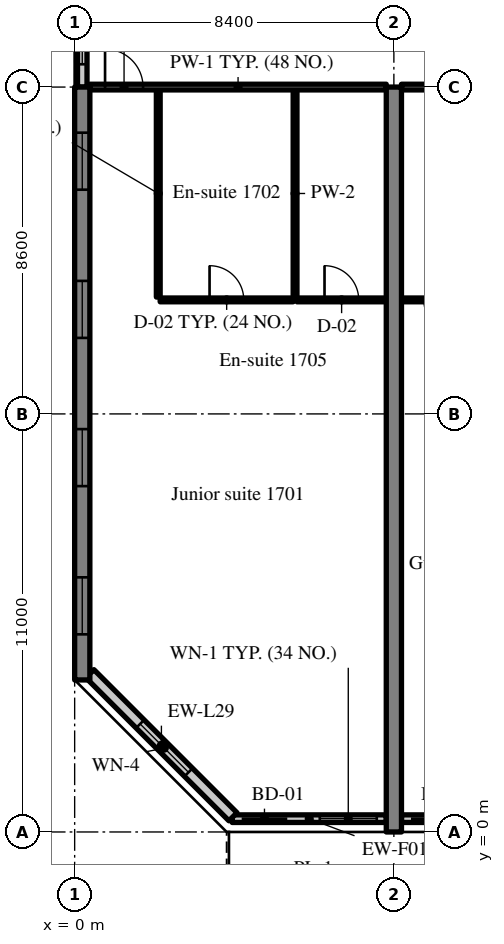
"""IFC4 building model, lengths in metres.
Left out: names, types, materials, properties, quantities, classifications, styles, units other than length and angle.
Written with IfcOpenShell. Run it as: python <this file> out.ifc"""

import sys

from ifc_helpers import new_model, si_unit, direction, frame, frame_2d, origin, place, context, subcontext, project, spatial, rectangle, extrude, source, transform, mapped, element, fill, save


model = new_model("IFC4")
c1 = context("Model", 3, precision=1e-05, world=origin(), true_north=direction((0.0, 1.0)))
c2 = subcontext(c1, "Body", "Model", "MODEL_VIEW")
j1 = project(units=[si_unit("LENGTHUNIT", "METRE"), si_unit("PLANEANGLEUNIT", "RADIAN")], contexts=[c1])
p1 = place(None, origin())
s1 = spatial("IfcSite", under=j1, at=p1, CompositionType="ELEMENT")
p2 = place(p1, origin())
s2 = spatial("IfcBuilding", under=s1, at=p2, CompositionType="ELEMENT")
p3 = place(p2, frame((0.0, 0.0, 73.4)))
s3 = spatial("IfcBuildingStorey", under=s2, at=p3, CompositionType="ELEMENT", Elevation=73.4)
m1 = source(origin(), c2, "Body", "SweptSolid", [
    extrude(rectangle(XDim=15.6, YDim=0.4, at=frame_2d((7.8, 0.0))), origin(), (0.0, 0.0, 1.0), 3.52),
])
p4 = place(p3, frame((0.2, 4.0, 0.0), z_axis=(0.0, 0.0, 1.0), x_axis=(0.0, 1.0, 0.0)))
e1 = element("IfcWall", 1, at=p4, inside=s3, PredefinedType="SHEAR", context=c2, shape_type="MappedRepresentation", body=[
    mapped(m1, transform((0.0, 0.0, 0.0), scale=1.0)),
])
m2 = source(origin(), c2, "Body", "SweptSolid", [
    extrude(rectangle(XDim=1.5, YDim=1.5, at=frame_2d((0.75, 0.75))), frame((0.0, 0.21, 0.0), z_axis=(0.0, -1.0, 0.0), x_axis=(1.0, 0.0, 0.0)), (0.0, 0.0, 1.0), 0.42),
])
p5 = place(p4, frame((1.2, 0.0, 0.9)))
e2 = element("IfcOpeningElement", 2, at=p5, cuts=e1, PredefinedType="OPENING", context=c2, shape_type="MappedRepresentation", body=[
    mapped(m2, transform((0.0, 0.0, 0.0), scale=1.0)),
])
p6 = place(p4, frame((5.1, 0.0, 0.9)))
e3 = element("IfcOpeningElement", 3, at=p6, cuts=e1, PredefinedType="OPENING", context=c2, shape_type="MappedRepresentation", body=[
    mapped(m2, transform((0.0, 0.0, 0.0), scale=1.0)),
])
p7 = place(p4, frame((9.0, 0.0, 0.9)))
e4 = element("IfcOpeningElement", 4, at=p7, cuts=e1, PredefinedType="OPENING", context=c2, shape_type="MappedRepresentation", body=[
    mapped(m2, transform((0.0, 0.0, 0.0), scale=1.0)),
])
p8 = place(p4, frame((12.9, 0.0, 0.9)))
e5 = element("IfcOpeningElement", 5, at=p8, cuts=e1, PredefinedType="OPENING", context=c2, shape_type="MappedRepresentation", body=[
    mapped(m2, transform((0.0, 0.0, 0.0), scale=1.0)),
])
m3 = source(origin(), c2, "Body", "SweptSolid", [
    extrude(rectangle(XDim=19.6, YDim=0.4, at=frame_2d((9.8, 0.0))), origin(), (0.0, 0.0, 1.0), 3.52),
])
p9 = place(p3, frame((8.4, 0.0, 0.0), z_axis=(0.0, 0.0, 1.0), x_axis=(0.0, 1.0, 0.0)))
e6 = element("IfcWall", 6, at=p9, inside=s3, PredefinedType="SHEAR", context=c2, shape_type="MappedRepresentation", body=[
    mapped(m3, transform((0.0, 0.0, 0.0), scale=1.0)),
])
m4 = source(origin(), c2, "Body", "SweptSolid", [
    extrude(rectangle(XDim=4.055, YDim=0.2, at=frame_2d((2.027, 0.0))), origin(), (0.0, 0.0, 1.0), 2.82),
])
p10 = place(p3, frame((4.145, 0.35, 0.0), z_axis=(0.0, 0.0, 1.0), x_axis=(1.0, 0.0, 0.0)))
e7 = element("IfcWall", 7, at=p10, inside=s3, PredefinedType="SOLIDWALL", context=c2, shape_type="MappedRepresentation", body=[
    mapped(m4, transform((0.0, 0.0, 0.0), scale=1.0)),
])
m5 = source(origin(), c2, "Body", "SweptSolid", [
    extrude(rectangle(XDim=1.2, YDim=2.4, at=frame_2d((0.6, 1.2))), frame((0.0, 0.11, 0.0), z_axis=(0.0, -1.0, 0.0), x_axis=(1.0, 0.0, 0.0)), (0.0, 0.0, 1.0), 0.22),
])
p11 = place(p10, frame((0.25, 0.0, 0.0)))
e8 = element("IfcOpeningElement", 8, at=p11, cuts=e7, PredefinedType="OPENING", context=c2, shape_type="MappedRepresentation", body=[
    mapped(m5, transform((0.0, 0.0, 0.0), scale=1.0)),
])
m6 = source(origin(), c2, "Body", "SweptSolid", [
    extrude(rectangle(XDim=1.5, YDim=1.5, at=frame_2d((0.75, 0.75))), frame((0.0, 0.11, 0.0), z_axis=(0.0, -1.0, 0.0), x_axis=(1.0, 0.0, 0.0)), (0.0, 0.0, 1.0), 0.22),
])
p12 = place(p10, frame((2.305, 0.0, 0.9)))
e9 = element("IfcOpeningElement", 9, at=p12, cuts=e7, PredefinedType="OPENING", context=c2, shape_type="MappedRepresentation", body=[
    mapped(m6, transform((0.0, 0.0, 0.0), scale=1.0)),
])
m7 = source(origin(), c2, "Body", "SweptSolid", [
    extrude(rectangle(XDim=3.6, YDim=0.2, at=frame_2d((1.8, 0.0))), origin(), (0.0, 0.0, 1.0), 2.82),
])
p13 = place(p3, frame((8.6, 0.35, 0.0), z_axis=(0.0, 0.0, 1.0), x_axis=(1.0, 0.0, 0.0)))
e10 = element("IfcWall", 10, at=p13, inside=s3, PredefinedType="SOLIDWALL", context=c2, shape_type="MappedRepresentation", body=[
    mapped(m7, transform((0.0, 0.0, 0.0), scale=1.0)),
])
p14 = place(p13, frame((0.25, 0.0, 0.0)))
e11 = element("IfcOpeningElement", 11, at=p14, cuts=e10, PredefinedType="OPENING", context=c2, shape_type="MappedRepresentation", body=[
    mapped(m5, transform((0.0, 0.0, 0.0), scale=1.0)),
])
p15 = place(p13, frame((1.85, 0.0, 0.9)))
e12 = element("IfcOpeningElement", 12, at=p15, cuts=e10, PredefinedType="OPENING", context=c2, shape_type="MappedRepresentation", body=[
    mapped(m6, transform((0.0, 0.0, 0.0), scale=1.0)),
])
m8 = source(origin(), c2, "Body", "SweptSolid", [
    extrude(rectangle(XDim=5.326, YDim=0.3, at=frame_2d((2.663, 0.0))), origin(), (0.0, 0.0, 1.0), 3.52),
])
p16 = place(p3, frame((0.4, 4.166, 0.0), z_axis=(0.0, 0.0, 1.0), x_axis=(0.707106781187, -0.707106781187, 0.0)))
e13 = element("IfcWall", 13, at=p16, inside=s3, PredefinedType="SOLIDWALL", context=c2, shape_type="MappedRepresentation", body=[
    mapped(m8, transform((0.0, 0.0, 0.0), scale=1.0)),
])
m9 = source(origin(), c2, "Body", "SweptSolid", [
    extrude(rectangle(XDim=1.8, YDim=1.5, at=frame_2d((0.9, 0.75))), frame((0.0, 0.16, 0.0), z_axis=(0.0, -1.0, 0.0), x_axis=(1.0, 0.0, 0.0)), (0.0, 0.0, 1.0), 0.32),
])
p17 = place(p16, frame((1.871, 0.0, 0.9)))
e14 = element("IfcOpeningElement", 14, at=p17, cuts=e13, PredefinedType="OPENING", context=c2, shape_type="MappedRepresentation", body=[
    mapped(m9, transform((0.0, 0.0, 0.0), scale=1.0)),
])
m10 = source(origin(), c2, "Body", "SweptSolid", [
    extrude(rectangle(XDim=2.4, YDim=0.25, at=frame_2d((1.2, 0.0))), origin(), (0.0, 0.0, 1.0), 2.62),
])
p18 = place(p3, frame((0.2, 19.6, 0.0), z_axis=(0.0, 0.0, 1.0), x_axis=(0.0, 1.0, 0.0)))
e15 = element("IfcWall", 15, at=p18, inside=s3, PredefinedType="SOLIDWALL", context=c2, shape_type="MappedRepresentation", body=[
    mapped(m10, transform((0.0, 0.0, 0.0), scale=1.0)),
])
m11 = source(origin(), c2, "Body", "SweptSolid", [
    extrude(rectangle(XDim=1.2, YDim=1.5, at=frame_2d((0.6, 0.75))), frame((0.0, 0.135, 0.0), z_axis=(0.0, -1.0, 0.0), x_axis=(1.0, 0.0, 0.0)), (0.0, 0.0, 1.0), 0.27),
])
p19 = place(p18, frame((0.6, 0.0, 0.9)))
e16 = element("IfcOpeningElement", 16, at=p19, cuts=e15, PredefinedType="OPENING", context=c2, shape_type="MappedRepresentation", body=[
    mapped(m11, transform((0.0, 0.0, 0.0), scale=1.0)),
])
m12 = source(origin(), c2, "Body", "SweptSolid", [
    extrude(rectangle(XDim=5.45, YDim=0.1, at=frame_2d((2.725, 0.0))), origin(), (0.0, 0.0, 1.0), 3.52),
])
for number, where, z_axis, x_axis in (
    (17, (2.2, 14.075, 0.0), (0.0, 0.0, 1.0), (0.0, 1.0, 0.0)),
    (18, (5.8, 14.075, 0.0), (0.0, 0.0, 1.0), (0.0, 1.0, 0.0)),
):
    element("IfcWall", number, at=place(p3, frame(where, z_axis=z_axis, x_axis=x_axis)), inside=s3, PredefinedType="PARTITIONING", context=c2, shape_type="MappedRepresentation", body=[
        mapped(m12, transform((0.0, 0.0, 0.0), scale=1.0)),
    ])
m13 = source(origin(), c2, "Body", "SweptSolid", [
    extrude(rectangle(XDim=3.5, YDim=0.1, at=frame_2d((1.75, 0.0))), origin(), (0.0, 0.0, 1.0), 3.52),
])
p20 = place(p3, frame((2.25, 14.0, 0.0), z_axis=(0.0, 0.0, 1.0), x_axis=(1.0, 0.0, 0.0)))
e19 = element("IfcWall", 19, at=p20, inside=s3, PredefinedType="PARTITIONING", context=c2, shape_type="MappedRepresentation", body=[
    mapped(m13, transform((0.0, 0.0, 0.0), scale=1.0)),
])
m14 = source(origin(), c2, "Body", "SweptSolid", [
    extrude(rectangle(XDim=0.9, YDim=2.1, at=frame_2d((0.45, 1.05))), frame((0.0, 0.06, 0.0), z_axis=(0.0, -1.0, 0.0), x_axis=(1.0, 0.0, 0.0)), (0.0, 0.0, 1.0), 0.12),
])
p21 = place(p20, frame((1.3, 0.0, 0.0)))
e20 = element("IfcOpeningElement", 20, at=p21, cuts=e19, PredefinedType="OPENING", context=c2, shape_type="MappedRepresentation", body=[
    mapped(m14, transform((0.0, 0.0, 0.0), scale=1.0)),
])
m15 = source(origin(), c2, "Body", "SweptSolid", [
    extrude(rectangle(XDim=2.35, YDim=0.1, at=frame_2d((1.175, 0.0))), origin(), (0.0, 0.0, 1.0), 3.52),
])
p22 = place(p3, frame((5.85, 14.0, 0.0), z_axis=(0.0, 0.0, 1.0), x_axis=(1.0, 0.0, 0.0)))
e21 = element("IfcWall", 21, at=p22, inside=s3, PredefinedType="PARTITIONING", context=c2, shape_type="MappedRepresentation", body=[
    mapped(m15, transform((0.0, 0.0, 0.0), scale=1.0)),
])
p23 = place(p22, frame((0.725, 0.0, 0.0)))
e22 = element("IfcOpeningElement", 22, at=p23, cuts=e21, PredefinedType="OPENING", context=c2, shape_type="MappedRepresentation", body=[
    mapped(m14, transform((0.0, 0.0, 0.0), scale=1.0)),
])
m16 = source(origin(), c2, "Body", "SweptSolid", [
    extrude(rectangle(XDim=7.8, YDim=0.15, at=frame_2d((3.9, 0.0))), origin(), (0.0, 0.0, 1.0), 2.82),
])
p24 = place(p3, frame((0.4, 19.6, 0.0), z_axis=(0.0, 0.0, 1.0), x_axis=(1.0, 0.0, 0.0)))
e23 = element("IfcWall", 23, at=p24, inside=s3, PredefinedType="PARTITIONING", context=c2, shape_type="MappedRepresentation", body=[
    mapped(m16, transform((0.0, 0.0, 0.0), scale=1.0)),
])
m17 = source(origin(), c2, "Body", "SweptSolid", [
    extrude(rectangle(XDim=1.0, YDim=2.1, at=frame_2d((0.5, 1.05))), frame((0.0, 0.085, 0.0), z_axis=(0.0, -1.0, 0.0), x_axis=(1.0, 0.0, 0.0)), (0.0, 0.0, 1.0), 0.17),
])
p25 = place(p24, frame((0.4, 0.0, 0.0)))
e24 = element("IfcOpeningElement", 24, at=p25, cuts=e23, PredefinedType="OPENING", context=c2, shape_type="MappedRepresentation", body=[
    mapped(m17, transform((0.0, 0.0, 0.0), scale=1.0)),
])
m18 = source(origin(), c2, "Body", "SweptSolid", [
    extrude(rectangle(XDim=2.075, YDim=0.1, at=frame_2d((1.038, 0.0))), origin(), (0.0, 0.0, 1.0), 3.52),
])
p26 = place(p3, frame((8.6, 14.0, 0.0), z_axis=(0.0, 0.0, 1.0), x_axis=(1.0, 0.0, 0.0)))
e25 = element("IfcWall", 25, at=p26, inside=s3, PredefinedType="PARTITIONING", context=c2, shape_type="MappedRepresentation", body=[
    mapped(m18, transform((0.0, 0.0, 0.0), scale=1.0)),
])
p27 = place(p26, frame((0.588, 0.0, 0.0)))
e26 = element("IfcOpeningElement", 26, at=p27, cuts=e25, PredefinedType="OPENING", context=c2, shape_type="MappedRepresentation", body=[
    mapped(m14, transform((0.0, 0.0, 0.0), scale=1.0)),
])
m19 = source(origin(), c2, "Body", "SweptSolid", [
    extrude(rectangle(XDim=3.925, YDim=0.15, at=frame_2d((1.962, 0.0))), origin(), (0.0, 0.0, 1.0), 2.82),
])
p28 = place(p3, frame((8.6, 19.6, 0.0), z_axis=(0.0, 0.0, 1.0), x_axis=(1.0, 0.0, 0.0)))
e27 = element("IfcWall", 27, at=p28, inside=s3, PredefinedType="PARTITIONING", context=c2, shape_type="MappedRepresentation", body=[
    mapped(m19, transform((0.0, 0.0, 0.0), scale=1.0)),
])
p29 = place(p28, frame((2.525, 0.0, 0.0)))
e28 = element("IfcOpeningElement", 28, at=p29, cuts=e27, PredefinedType="OPENING", context=c2, shape_type="MappedRepresentation", body=[
    mapped(m17, transform((0.0, 0.0, 0.0), scale=1.0)),
])
m20 = source(origin(), c2, "Body", "SweptSolid", [
    extrude(rectangle(XDim=1.2, YDim=2.4, at=frame_2d((0.6, 1.2))), frame((0.0, 0.025, 0.0), z_axis=(0.0, -1.0, 0.0), x_axis=(1.0, 0.0, 0.0)), (0.0, 0.0, 1.0), 0.05),
])
p30 = place(p11, origin())
e29 = element("IfcDoor", 29, at=p30, inside=s3, OperationType="SLIDING_TO_LEFT", PredefinedType="DOOR", context=c2, shape_type="MappedRepresentation", body=[
    mapped(m20, transform((0.0, 0.0, 0.0), scale=1.0)),
])
fill(e8, e29)
m21 = source(origin(), c2, "Body", "SweptSolid", [
    extrude(rectangle(XDim=1.5, YDim=1.5, at=frame_2d((0.75, 0.75))), frame((0.0, 0.03, 0.0), z_axis=(0.0, -1.0, 0.0), x_axis=(1.0, 0.0, 0.0)), (0.0, 0.0, 1.0), 0.06),
])
p31 = place(p12, origin())
e30 = element("IfcWindow", 30, at=p31, inside=s3, PartitioningType="SINGLE_PANEL", PredefinedType="WINDOW", context=c2, shape_type="MappedRepresentation", body=[
    mapped(m21, transform((0.0, 0.0, 0.0), scale=1.0)),
])
fill(e9, e30)
p32 = place(p14, origin())
e31 = element("IfcDoor", 31, at=p32, inside=s3, OperationType="SLIDING_TO_RIGHT", PredefinedType="DOOR", context=c2, shape_type="MappedRepresentation", body=[
    mapped(m20, transform((0.0, 0.0, 0.0), scale=1.0)),
])
fill(e11, e31)
m22 = source(origin(), c2, "Body", "SweptSolid", [
    extrude(rectangle(XDim=1.8, YDim=1.5, at=frame_2d((0.9, 0.75))), frame((0.0, 0.03, 0.0), z_axis=(0.0, -1.0, 0.0), x_axis=(1.0, 0.0, 0.0)), (0.0, 0.0, 1.0), 0.06),
])
p33 = place(p17, origin())
e32 = element("IfcWindow", 32, at=p33, inside=s3, PartitioningType="SINGLE_PANEL", PredefinedType="WINDOW", context=c2, shape_type="MappedRepresentation", body=[
    mapped(m22, transform((0.0, 0.0, 0.0), scale=1.0)),
])
fill(e14, e32)
p34 = place(p5, origin())
e33 = element("IfcWindow", 33, at=p34, inside=s3, PartitioningType="SINGLE_PANEL", PredefinedType="WINDOW", context=c2, shape_type="MappedRepresentation", body=[
    mapped(m21, transform((0.0, 0.0, 0.0), scale=1.0)),
])
fill(e2, e33)
p35 = place(p6, origin())
e34 = element("IfcWindow", 34, at=p35, inside=s3, PartitioningType="SINGLE_PANEL", PredefinedType="WINDOW", context=c2, shape_type="MappedRepresentation", body=[
    mapped(m21, transform((0.0, 0.0, 0.0), scale=1.0)),
])
fill(e3, e34)
p36 = place(p7, origin())
e35 = element("IfcWindow", 35, at=p36, inside=s3, PartitioningType="SINGLE_PANEL", PredefinedType="WINDOW", context=c2, shape_type="MappedRepresentation", body=[
    mapped(m21, transform((0.0, 0.0, 0.0), scale=1.0)),
])
fill(e4, e35)
p37 = place(p8, origin())
e36 = element("IfcWindow", 36, at=p37, inside=s3, PartitioningType="SINGLE_PANEL", PredefinedType="WINDOW", context=c2, shape_type="MappedRepresentation", body=[
    mapped(m21, transform((0.0, 0.0, 0.0), scale=1.0)),
])
fill(e5, e36)
m23 = source(origin(), c2, "Body", "SweptSolid", [
    extrude(rectangle(XDim=1.2, YDim=1.5, at=frame_2d((0.6, 0.75))), frame((0.0, 0.03, 0.0), z_axis=(0.0, -1.0, 0.0), x_axis=(1.0, 0.0, 0.0)), (0.0, 0.0, 1.0), 0.06),
])
p38 = place(p19, origin())
e37 = element("IfcWindow", 37, at=p38, inside=s3, PartitioningType="SINGLE_PANEL", PredefinedType="WINDOW", context=c2, shape_type="MappedRepresentation", body=[
    mapped(m23, transform((0.0, 0.0, 0.0), scale=1.0)),
])
fill(e16, e37)
m24 = source(origin(), c2, "Body", "SweptSolid", [
    extrude(rectangle(XDim=0.9, YDim=2.1, at=frame_2d((0.45, 1.05))), frame((0.0, 0.025, 0.0), z_axis=(0.0, -1.0, 0.0), x_axis=(1.0, 0.0, 0.0)), (0.0, 0.0, 1.0), 0.05),
])
p39 = place(p21, origin())
e38 = element("IfcDoor", 38, at=p39, inside=s3, OperationType="SINGLE_SWING_LEFT", PredefinedType="DOOR", context=c2, shape_type="MappedRepresentation", body=[
    mapped(m24, transform((0.0, 0.0, 0.0), scale=1.0)),
])
fill(e20, e38)
p40 = place(p23, origin())
e39 = element("IfcDoor", 39, at=p40, inside=s3, OperationType="SINGLE_SWING_LEFT", PredefinedType="DOOR", context=c2, shape_type="MappedRepresentation", body=[
    mapped(m24, transform((0.0, 0.0, 0.0), scale=1.0)),
])
fill(e22, e39)
m25 = source(origin(), c2, "Body", "SweptSolid", [
    extrude(rectangle(XDim=1.0, YDim=2.1, at=frame_2d((0.5, 1.05))), frame((0.0, 0.025, 0.0), z_axis=(0.0, -1.0, 0.0), x_axis=(1.0, 0.0, 0.0)), (0.0, 0.0, 1.0), 0.05),
])
p41 = place(p25, origin())
e40 = element("IfcDoor", 40, at=p41, inside=s3, OperationType="SINGLE_SWING_LEFT", PredefinedType="DOOR", context=c2, shape_type="MappedRepresentation", body=[
    mapped(m25, transform((0.0, 0.0, 0.0), scale=1.0)),
])
fill(e24, e40)
p42 = place(p27, origin())
e41 = element("IfcDoor", 41, at=p42, inside=s3, OperationType="SINGLE_SWING_RIGHT", PredefinedType="DOOR", context=c2, shape_type="MappedRepresentation", body=[
    mapped(m24, transform((0.0, 0.0, 0.0), scale=1.0)),
])
fill(e26, e41)
save(model, sys.argv[1])
